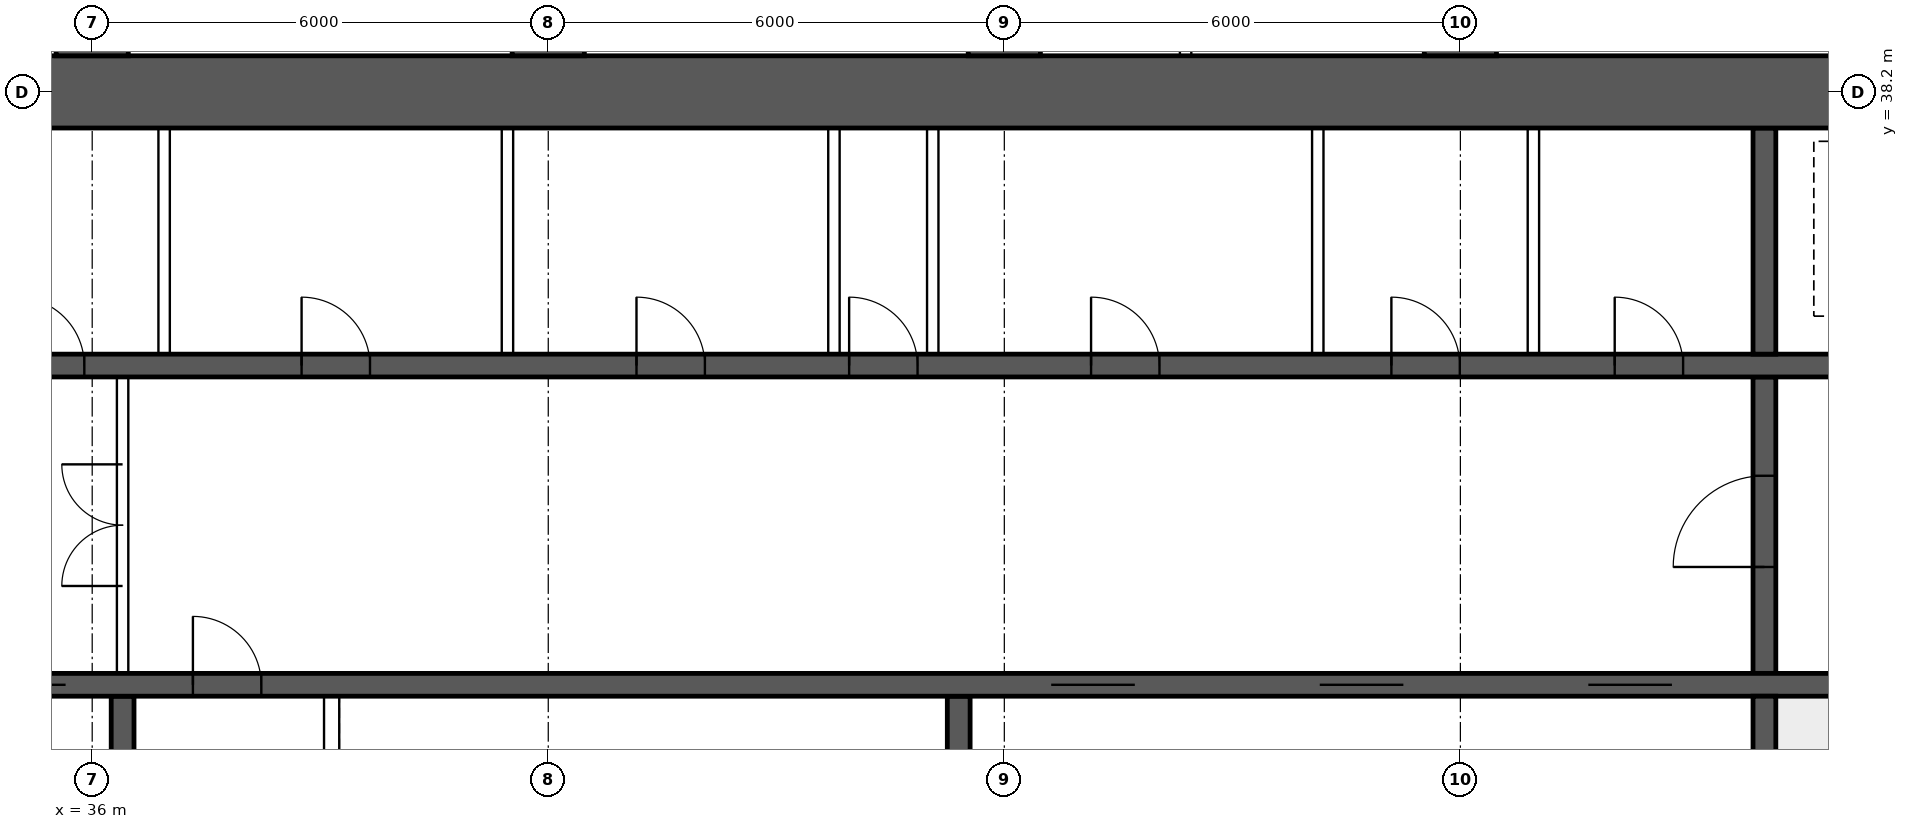
"""IFC4 building model, lengths in metres.
Left out: names, types, materials, properties, quantities, classifications, styles, units other than length and angle.
Written with IfcOpenShell. Run it as: python <this file> out.ifc"""

import sys

from ifc_helpers import new_model, si_unit, direction, frame, frame_2d, origin, place, context, subcontext, project, spatial, rectangle, extrude, element, fill, save


model = new_model("IFC4")
c1 = context("Model", 3, precision=1e-05, world=origin(), true_north=direction((0.0, 1.0)))
c2 = subcontext(c1, "Body", "Model", "MODEL_VIEW")
j1 = project(units=[si_unit("LENGTHUNIT", "METRE"), si_unit("PLANEANGLEUNIT", "RADIAN")], contexts=[c1])
p1 = place(None, origin())
s1 = spatial("IfcSite", under=j1, at=p1, CompositionType="ELEMENT")
p2 = place(p1, origin())
s2 = spatial("IfcBuilding", under=s1, at=p2, CompositionType="ELEMENT")
p3 = place(p2, frame((0.0, 0.0, 91.9)))
s3 = spatial("IfcBuildingStorey", under=s2, at=p3, CompositionType="ELEMENT", Elevation=91.9)
p4 = place(p3, frame((18.0, 38.2, 0.0), z_axis=(0.0, 0.0, 1.0), x_axis=(1.0, 0.0, 0.0)))
e1 = element("IfcWall", 1, at=p4, inside=s3, PredefinedType="SHEAR", context=c2, shape_type="SweptSolid", body=[
    extrude(rectangle(XDim=48.0, YDim=0.95, at=frame_2d((24.0, 0.0))), origin(), (0.0, 0.0, 1.0), 3.75),
])
p5 = place(p3, frame((18.475, 30.4, 0.0), z_axis=(0.0, 0.0, 1.0), x_axis=(1.0, 0.0, 0.0)))
e2 = element("IfcWall", 2, at=p5, inside=s3, PredefinedType="SHEAR", context=c2, shape_type="SweptSolid", body=[
    extrude(rectangle(XDim=47.05, YDim=0.3, at=frame_2d((23.525, 0.0))), origin(), (0.0, 0.0, 1.0), 3.75),
])
p6 = place(p5, frame((0.4, 0.0, 0.0)))
e3 = element("IfcOpeningElement", 3, at=p6, cuts=e2, PredefinedType="OPENING", context=c2, shape_type="SweptSolid", body=[
    extrude(rectangle(XDim=1.0, YDim=2.1, at=frame_2d((0.5, 1.05))), frame((0.0, 0.16, 0.0), z_axis=(0.0, -1.0, 0.0), x_axis=(1.0, 0.0, 0.0)), (0.0, 0.0, 1.0), 0.32),
])
p7 = place(p5, frame((45.65, 0.0, 0.0)))
e4 = element("IfcOpeningElement", 4, at=p7, cuts=e2, PredefinedType="OPENING", context=c2, shape_type="SweptSolid", body=[
    extrude(rectangle(XDim=1.0, YDim=2.1, at=frame_2d((0.5, 1.05))), frame((0.0, 0.16, 0.0), z_axis=(0.0, -1.0, 0.0), x_axis=(1.0, 0.0, 0.0)), (0.0, 0.0, 1.0), 0.32),
])
p8 = place(p5, frame((8.275, 0.0, 0.0)))
e5 = element("IfcOpeningElement", 5, at=p8, cuts=e2, PredefinedType="OPENING", context=c2, shape_type="SweptSolid", body=[
    extrude(rectangle(XDim=1.1, YDim=2.1, at=frame_2d((0.55, 1.05))), frame((0.0, 0.16, 0.0), z_axis=(0.0, -1.0, 0.0), x_axis=(1.0, 0.0, 0.0)), (0.0, 0.0, 1.0), 0.32),
])
p9 = place(p5, frame((10.875, 0.0, 0.0)))
e6 = element("IfcOpeningElement", 6, at=p9, cuts=e2, PredefinedType="OPENING", context=c2, shape_type="SweptSolid", body=[
    extrude(rectangle(XDim=1.1, YDim=2.1, at=frame_2d((0.55, 1.05))), frame((0.0, 0.16, 0.0), z_axis=(0.0, -1.0, 0.0), x_axis=(1.0, 0.0, 0.0)), (0.0, 0.0, 1.0), 0.32),
])
p10 = place(p5, frame((13.475, 0.0, 0.0)))
e7 = element("IfcOpeningElement", 7, at=p10, cuts=e2, PredefinedType="OPENING", context=c2, shape_type="SweptSolid", body=[
    extrude(rectangle(XDim=1.1, YDim=2.1, at=frame_2d((0.55, 1.05))), frame((0.0, 0.16, 0.0), z_axis=(0.0, -1.0, 0.0), x_axis=(1.0, 0.0, 0.0)), (0.0, 0.0, 1.0), 0.32),
])
p11 = place(p5, frame((16.075, 0.0, 0.0)))
e8 = element("IfcOpeningElement", 8, at=p11, cuts=e2, PredefinedType="OPENING", context=c2, shape_type="SweptSolid", body=[
    extrude(rectangle(XDim=1.1, YDim=2.1, at=frame_2d((0.55, 1.05))), frame((0.0, 0.16, 0.0), z_axis=(0.0, -1.0, 0.0), x_axis=(1.0, 0.0, 0.0)), (0.0, 0.0, 1.0), 0.32),
])
p12 = place(p5, frame((18.85, 0.0, 0.0)))
e9 = element("IfcOpeningElement", 9, at=p12, cuts=e2, PredefinedType="OPENING", context=c2, shape_type="SweptSolid", body=[
    extrude(rectangle(XDim=0.9, YDim=2.1, at=frame_2d((0.45, 1.05))), frame((0.0, 0.16, 0.0), z_axis=(0.0, -1.0, 0.0), x_axis=(1.0, 0.0, 0.0)), (0.0, 0.0, 1.0), 0.32),
])
p13 = place(p5, frame((30.142, 0.0, 0.0)))
e10 = element("IfcOpeningElement", 10, at=p13, cuts=e2, PredefinedType="OPENING", context=c2, shape_type="SweptSolid", body=[
    extrude(rectangle(XDim=1.1, YDim=2.1, at=frame_2d((0.55, 1.05))), frame((0.0, 0.16, 0.0), z_axis=(0.0, -1.0, 0.0), x_axis=(1.0, 0.0, 0.0)), (0.0, 0.0, 1.0), 0.32),
])
p14 = place(p5, frame((33.675, 0.0, 0.0)))
e11 = element("IfcOpeningElement", 11, at=p14, cuts=e2, PredefinedType="OPENING", context=c2, shape_type="SweptSolid", body=[
    extrude(rectangle(XDim=1.1, YDim=2.1, at=frame_2d((0.55, 1.05))), frame((0.0, 0.16, 0.0), z_axis=(0.0, -1.0, 0.0), x_axis=(1.0, 0.0, 0.0)), (0.0, 0.0, 1.0), 0.32),
])
p15 = place(p5, frame((37.208, 0.0, 0.0)))
e12 = element("IfcOpeningElement", 12, at=p15, cuts=e2, PredefinedType="OPENING", context=c2, shape_type="SweptSolid", body=[
    extrude(rectangle(XDim=1.1, YDim=2.1, at=frame_2d((0.55, 1.05))), frame((0.0, 0.16, 0.0), z_axis=(0.0, -1.0, 0.0), x_axis=(1.0, 0.0, 0.0)), (0.0, 0.0, 1.0), 0.32),
])
p16 = place(p3, frame((18.475, 34.6, 0.0), z_axis=(0.0, 0.0, 1.0), x_axis=(1.0, 0.0, 0.0)))
e13 = element("IfcWall", 13, at=p16, inside=s3, PredefinedType="SHEAR", context=c2, shape_type="SweptSolid", body=[
    extrude(rectangle(XDim=47.05, YDim=0.3, at=frame_2d((23.525, 0.0))), origin(), (0.0, 0.0, 1.0), 3.75),
])
p17 = place(p16, frame((0.9, 0.0, 0.0)))
e14 = element("IfcOpeningElement", 14, at=p17, cuts=e13, PredefinedType="OPENING", context=c2, shape_type="SweptSolid", body=[
    extrude(rectangle(XDim=1.1, YDim=2.1, at=frame_2d((0.55, 1.05))), frame((0.0, 0.16, 0.0), z_axis=(0.0, -1.0, 0.0), x_axis=(1.0, 0.0, 0.0)), (0.0, 0.0, 1.0), 0.32),
])
p18 = place(p16, frame((45.05, 0.0, 0.0)))
e15 = element("IfcOpeningElement", 15, at=p18, cuts=e13, PredefinedType="OPENING", context=c2, shape_type="SweptSolid", body=[
    extrude(rectangle(XDim=1.1, YDim=2.1, at=frame_2d((0.55, 1.05))), frame((0.0, 0.16, 0.0), z_axis=(0.0, -1.0, 0.0), x_axis=(1.0, 0.0, 0.0)), (0.0, 0.0, 1.0), 0.32),
])
p19 = place(p16, frame((4.125, 0.0, 0.0)))
e16 = element("IfcOpeningElement", 16, at=p19, cuts=e13, PredefinedType="OPENING", context=c2, shape_type="SweptSolid", body=[
    extrude(rectangle(XDim=0.9, YDim=2.1, at=frame_2d((0.45, 1.05))), frame((0.0, 0.16, 0.0), z_axis=(0.0, -1.0, 0.0), x_axis=(1.0, 0.0, 0.0)), (0.0, 0.0, 1.0), 0.32),
])
p20 = place(p16, frame((42.025, 0.0, 0.0)))
e17 = element("IfcOpeningElement", 17, at=p20, cuts=e13, PredefinedType="OPENING", context=c2, shape_type="SweptSolid", body=[
    extrude(rectangle(XDim=0.9, YDim=2.1, at=frame_2d((0.45, 1.05))), frame((0.0, 0.16, 0.0), z_axis=(0.0, -1.0, 0.0), x_axis=(1.0, 0.0, 0.0)), (0.0, 0.0, 1.0), 0.32),
])
p21 = place(p16, frame((8.9, 0.0, 0.0)))
e18 = element("IfcOpeningElement", 18, at=p21, cuts=e13, PredefinedType="OPENING", context=c2, shape_type="SweptSolid", body=[
    extrude(rectangle(XDim=0.9, YDim=2.1, at=frame_2d((0.45, 1.05))), frame((0.0, 0.16, 0.0), z_axis=(0.0, -1.0, 0.0), x_axis=(1.0, 0.0, 0.0)), (0.0, 0.0, 1.0), 0.32),
])
p22 = place(p16, frame((12.874, 0.0, 0.0)))
e19 = element("IfcOpeningElement", 19, at=p22, cuts=e13, PredefinedType="OPENING", context=c2, shape_type="SweptSolid", body=[
    extrude(rectangle(XDim=0.9, YDim=2.1, at=frame_2d((0.45, 1.05))), frame((0.0, 0.16, 0.0), z_axis=(0.0, -1.0, 0.0), x_axis=(1.0, 0.0, 0.0)), (0.0, 0.0, 1.0), 0.32),
])
p23 = place(p16, frame((16.521, 0.0, 0.0)))
e20 = element("IfcOpeningElement", 20, at=p23, cuts=e13, PredefinedType="OPENING", context=c2, shape_type="SweptSolid", body=[
    extrude(rectangle(XDim=0.9, YDim=2.1, at=frame_2d((0.45, 1.05))), frame((0.0, 0.16, 0.0), z_axis=(0.0, -1.0, 0.0), x_axis=(1.0, 0.0, 0.0)), (0.0, 0.0, 1.0), 0.32),
])
p24 = place(p16, frame((20.28, 0.0, 0.0)))
e21 = element("IfcOpeningElement", 21, at=p24, cuts=e13, PredefinedType="OPENING", context=c2, shape_type="SweptSolid", body=[
    extrude(rectangle(XDim=0.9, YDim=2.1, at=frame_2d((0.45, 1.05))), frame((0.0, 0.16, 0.0), z_axis=(0.0, -1.0, 0.0), x_axis=(1.0, 0.0, 0.0)), (0.0, 0.0, 1.0), 0.32),
])
p25 = place(p16, frame((24.686, 0.0, 0.0)))
e22 = element("IfcOpeningElement", 22, at=p25, cuts=e13, PredefinedType="OPENING", context=c2, shape_type="SweptSolid", body=[
    extrude(rectangle(XDim=0.9, YDim=2.1, at=frame_2d((0.45, 1.05))), frame((0.0, 0.16, 0.0), z_axis=(0.0, -1.0, 0.0), x_axis=(1.0, 0.0, 0.0)), (0.0, 0.0, 1.0), 0.32),
])
p26 = place(p16, frame((27.483, 0.0, 0.0)))
e23 = element("IfcOpeningElement", 23, at=p26, cuts=e13, PredefinedType="OPENING", context=c2, shape_type="SweptSolid", body=[
    extrude(rectangle(XDim=0.9, YDim=2.1, at=frame_2d((0.45, 1.05))), frame((0.0, 0.16, 0.0), z_axis=(0.0, -1.0, 0.0), x_axis=(1.0, 0.0, 0.0)), (0.0, 0.0, 1.0), 0.32),
])
p27 = place(p16, frame((30.666, 0.0, 0.0)))
e24 = element("IfcOpeningElement", 24, at=p27, cuts=e13, PredefinedType="OPENING", context=c2, shape_type="SweptSolid", body=[
    extrude(rectangle(XDim=0.9, YDim=2.1, at=frame_2d((0.45, 1.05))), frame((0.0, 0.16, 0.0), z_axis=(0.0, -1.0, 0.0), x_axis=(1.0, 0.0, 0.0)), (0.0, 0.0, 1.0), 0.32),
])
p28 = place(p16, frame((34.617, 0.0, 0.0)))
e25 = element("IfcOpeningElement", 25, at=p28, cuts=e13, PredefinedType="OPENING", context=c2, shape_type="SweptSolid", body=[
    extrude(rectangle(XDim=0.9, YDim=2.1, at=frame_2d((0.45, 1.05))), frame((0.0, 0.16, 0.0), z_axis=(0.0, -1.0, 0.0), x_axis=(1.0, 0.0, 0.0)), (0.0, 0.0, 1.0), 0.32),
])
p29 = place(p16, frame((37.555, 0.0, 0.0)))
e26 = element("IfcOpeningElement", 26, at=p29, cuts=e13, PredefinedType="OPENING", context=c2, shape_type="SweptSolid", body=[
    extrude(rectangle(XDim=0.9, YDim=2.1, at=frame_2d((0.45, 1.05))), frame((0.0, 0.16, 0.0), z_axis=(0.0, -1.0, 0.0), x_axis=(1.0, 0.0, 0.0)), (0.0, 0.0, 1.0), 0.32),
])
p30 = place(p3, frame((58.0, 26.275, 0.0), z_axis=(0.0, 0.0, 1.0), x_axis=(0.0, 1.0, 0.0)))
e27 = element("IfcWall", 27, at=p30, inside=s3, PredefinedType="SHEAR", context=c2, shape_type="SweptSolid", body=[
    extrude(rectangle(XDim=3.975, YDim=0.3, at=frame_2d((1.988, 0.0))), origin(), (0.0, 0.0, 1.0), 3.75),
])
p31 = place(p3, frame((58.0, 30.55, 0.0), z_axis=(0.0, 0.0, 1.0), x_axis=(0.0, 1.0, 0.0)))
e28 = element("IfcWall", 28, at=p31, inside=s3, PredefinedType="SHEAR", context=c2, shape_type="SweptSolid", body=[
    extrude(rectangle(XDim=3.9, YDim=0.3, at=frame_2d((1.95, 0.0))), origin(), (0.0, 0.0, 1.0), 3.75),
])
p32 = place(p31, frame((1.4, 0.0, 0.0)))
e29 = element("IfcOpeningElement", 29, at=p32, cuts=e28, PredefinedType="OPENING", context=c2, shape_type="SweptSolid", body=[
    extrude(rectangle(XDim=1.2, YDim=2.1, at=frame_2d((0.6, 1.05))), frame((0.0, 0.16, 0.0), z_axis=(0.0, -1.0, 0.0), x_axis=(1.0, 0.0, 0.0)), (0.0, 0.0, 1.0), 0.32),
])
p33 = place(p3, frame((58.0, 34.75, 0.0), z_axis=(0.0, 0.0, 1.0), x_axis=(0.0, 1.0, 0.0)))
e30 = element("IfcWall", 30, at=p33, inside=s3, PredefinedType="SHEAR", context=c2, shape_type="SweptSolid", body=[
    extrude(rectangle(XDim=2.975, YDim=0.3, at=frame_2d((1.488, 0.0))), origin(), (0.0, 0.0, 1.0), 3.75),
])
for number, where, z_axis, x_axis in (
    (31, (36.4, 26.275, 0.0), (0.0, 0.0, 1.0), (0.0, 1.0, 0.0)),
    (32, (47.4, 26.275, 0.0), (0.0, 0.0, 1.0), (0.0, 1.0, 0.0)),
):
    element("IfcWall", number, at=place(p3, frame(where, z_axis=z_axis, x_axis=x_axis)), inside=s3, PredefinedType="SHEAR", context=c2, shape_type="SweptSolid", body=[
        extrude(rectangle(XDim=3.975, YDim=0.3, at=frame_2d((1.988, 0.0))), origin(), (0.0, 0.0, 1.0), 3.75),
    ])
for number, where, z_axis, x_axis in (
    (33, (36.0, 38.675, 0.0), (0.0, 0.0, 1.0), (0.0, 1.0, 0.0)),
    (34, (42.0, 38.675, 0.0), (0.0, 0.0, 1.0), (0.0, 1.0, 0.0)),
    (35, (48.0, 38.675, 0.0), (0.0, 0.0, 1.0), (0.0, 1.0, 0.0)),
    (36, (54.0, 38.675, 0.0), (0.0, 0.0, 1.0), (0.0, 1.0, 0.0)),
):
    element("IfcWall", number, at=place(p3, frame(where, z_axis=z_axis, x_axis=x_axis)), inside=s3, PredefinedType="SHEAR", context=c2, shape_type="SweptSolid", body=[
        extrude(rectangle(XDim=9.325, YDim=0.95, at=frame_2d((4.663, 0.0))), origin(), (0.0, 0.0, 1.0), 3.75),
    ])
p34 = place(p3, frame((36.4, 30.55, 0.0), z_axis=(0.0, 0.0, 1.0), x_axis=(0.0, 1.0, 0.0)))
e37 = element("IfcWall", 37, at=p34, inside=s3, PredefinedType="SOLIDWALL", context=c2, shape_type="SweptSolid", body=[
    extrude(rectangle(XDim=3.9, YDim=0.15, at=frame_2d((1.95, 0.0))), origin(), (0.0, 0.0, 1.0), 3.5),
])
p35 = place(p34, frame((1.15, 0.0, 0.0)))
e38 = element("IfcOpeningElement", 38, at=p35, cuts=e37, PredefinedType="OPENING", context=c2, shape_type="SweptSolid", body=[
    extrude(rectangle(XDim=1.6, YDim=2.1, at=frame_2d((0.8, 1.05))), frame((0.0, 0.085, 0.0), z_axis=(0.0, -1.0, 0.0), x_axis=(1.0, 0.0, 0.0)), (0.0, 0.0, 1.0), 0.17),
])
for number, where, z_axis, x_axis in (
    (39, (36.946, 34.75, 0.0), (0.0, 0.0, 1.0), (0.0, 1.0, 0.0)),
    (40, (41.463, 34.75, 0.0), (0.0, 0.0, 1.0), (0.0, 1.0, 0.0)),
    (41, (45.758, 34.75, 0.0), (0.0, 0.0, 1.0), (0.0, 1.0, 0.0)),
    (42, (47.058, 34.75, 0.0), (0.0, 0.0, 1.0), (0.0, 1.0, 0.0)),
    (43, (52.124, 34.75, 0.0), (0.0, 0.0, 1.0), (0.0, 1.0, 0.0)),
    (44, (54.961, 34.75, 0.0), (0.0, 0.0, 1.0), (0.0, 1.0, 0.0)),
):
    element("IfcWall", number, at=place(p3, frame(where, z_axis=z_axis, x_axis=x_axis)), inside=s3, PredefinedType="SOLIDWALL", context=c2, shape_type="SweptSolid", body=[
        extrude(rectangle(XDim=2.975, YDim=0.15, at=frame_2d((1.488, 0.0))), origin(), (0.0, 0.0, 1.0), 3.5),
    ])
p36 = place(p3, frame((39.15, 26.275, 0.0), z_axis=(0.0, 0.0, 1.0), x_axis=(0.0, 1.0, 0.0)))
e45 = element("IfcWall", 45, at=p36, inside=s3, PredefinedType="SOLIDWALL", context=c2, shape_type="SweptSolid", body=[
    extrude(rectangle(XDim=3.975, YDim=0.2, at=frame_2d((1.988, 0.0))), origin(), (0.0, 0.0, 1.0), 3.5),
])
p37 = place(p3, frame((50.385, 38.675, 0.0), z_axis=(0.0, 0.0, 1.0), x_axis=(0.0, 1.0, 0.0)))
e46 = element("IfcWall", 46, at=p37, inside=s3, PredefinedType="PARTITIONING", context=c2, shape_type="SweptSolid", body=[
    extrude(rectangle(XDim=9.225, YDim=0.15, at=frame_2d((4.612, 0.0))), origin(), (0.0, 0.0, 1.0), 3.5),
])
p38 = place(p35, origin())
e47 = element("IfcDoor", 47, at=p38, inside=s3, OperationType="DOUBLE_DOOR_SINGLE_SWING", PredefinedType="DOOR", context=c2, shape_type="SweptSolid", body=[
    extrude(rectangle(XDim=1.6, YDim=2.1, at=frame_2d((0.8, 1.05))), frame((0.0, 0.025, 0.0), z_axis=(0.0, -1.0, 0.0), x_axis=(1.0, 0.0, 0.0)), (0.0, 0.0, 1.0), 0.05),
])
fill(e38, e47)
p39 = place(p32, origin())
e48 = element("IfcDoor", 48, at=p39, inside=s3, OperationType="SINGLE_SWING_LEFT", PredefinedType="DOOR", context=c2, shape_type="SweptSolid", body=[
    extrude(rectangle(XDim=1.2, YDim=2.1, at=frame_2d((0.6, 1.05))), frame((0.0, 0.025, 0.0), z_axis=(0.0, -1.0, 0.0), x_axis=(1.0, 0.0, 0.0)), (0.0, 0.0, 1.0), 0.05),
])
fill(e29, e48)
p40 = place(p23, origin())
e49 = element("IfcDoor", 49, at=p40, inside=s3, OperationType="SINGLE_SWING_LEFT", PredefinedType="DOOR", context=c2, shape_type="SweptSolid", body=[
    extrude(rectangle(XDim=0.9, YDim=2.1, at=frame_2d((0.45, 1.05))), frame((0.0, 0.025, 0.0), z_axis=(0.0, -1.0, 0.0), x_axis=(1.0, 0.0, 0.0)), (0.0, 0.0, 1.0), 0.05),
])
fill(e20, e49)
p41 = place(p24, origin())
e50 = element("IfcDoor", 50, at=p41, inside=s3, OperationType="SINGLE_SWING_LEFT", PredefinedType="DOOR", context=c2, shape_type="SweptSolid", body=[
    extrude(rectangle(XDim=0.9, YDim=2.1, at=frame_2d((0.45, 1.05))), frame((0.0, 0.025, 0.0), z_axis=(0.0, -1.0, 0.0), x_axis=(1.0, 0.0, 0.0)), (0.0, 0.0, 1.0), 0.05),
])
fill(e21, e50)
p42 = place(p25, origin())
e51 = element("IfcDoor", 51, at=p42, inside=s3, OperationType="SINGLE_SWING_LEFT", PredefinedType="DOOR", context=c2, shape_type="SweptSolid", body=[
    extrude(rectangle(XDim=0.9, YDim=2.1, at=frame_2d((0.45, 1.05))), frame((0.0, 0.025, 0.0), z_axis=(0.0, -1.0, 0.0), x_axis=(1.0, 0.0, 0.0)), (0.0, 0.0, 1.0), 0.05),
])
fill(e22, e51)
p43 = place(p26, origin())
e52 = element("IfcDoor", 52, at=p43, inside=s3, OperationType="SINGLE_SWING_LEFT", PredefinedType="DOOR", context=c2, shape_type="SweptSolid", body=[
    extrude(rectangle(XDim=0.9, YDim=2.1, at=frame_2d((0.45, 1.05))), frame((0.0, 0.025, 0.0), z_axis=(0.0, -1.0, 0.0), x_axis=(1.0, 0.0, 0.0)), (0.0, 0.0, 1.0), 0.05),
])
fill(e23, e52)
p44 = place(p27, origin())
e53 = element("IfcDoor", 53, at=p44, inside=s3, OperationType="SINGLE_SWING_LEFT", PredefinedType="DOOR", context=c2, shape_type="SweptSolid", body=[
    extrude(rectangle(XDim=0.9, YDim=2.1, at=frame_2d((0.45, 1.05))), frame((0.0, 0.025, 0.0), z_axis=(0.0, -1.0, 0.0), x_axis=(1.0, 0.0, 0.0)), (0.0, 0.0, 1.0), 0.05),
])
fill(e24, e53)
p45 = place(p28, origin())
e54 = element("IfcDoor", 54, at=p45, inside=s3, OperationType="SINGLE_SWING_LEFT", PredefinedType="DOOR", context=c2, shape_type="SweptSolid", body=[
    extrude(rectangle(XDim=0.9, YDim=2.1, at=frame_2d((0.45, 1.05))), frame((0.0, 0.025, 0.0), z_axis=(0.0, -1.0, 0.0), x_axis=(1.0, 0.0, 0.0)), (0.0, 0.0, 1.0), 0.05),
])
fill(e25, e54)
p46 = place(p29, origin())
e55 = element("IfcDoor", 55, at=p46, inside=s3, OperationType="SINGLE_SWING_LEFT", PredefinedType="DOOR", context=c2, shape_type="SweptSolid", body=[
    extrude(rectangle(XDim=0.9, YDim=2.1, at=frame_2d((0.45, 1.05))), frame((0.0, 0.025, 0.0), z_axis=(0.0, -1.0, 0.0), x_axis=(1.0, 0.0, 0.0)), (0.0, 0.0, 1.0), 0.05),
])
fill(e26, e55)
p47 = place(p11, origin())
e56 = element("IfcDoor", 56, at=p47, inside=s3, OperationType="DOUBLE_DOOR_SLIDING", PredefinedType="DOOR", context=c2, shape_type="SweptSolid", body=[
    extrude(rectangle(XDim=1.1, YDim=2.1, at=frame_2d((0.55, 1.05))), frame((0.0, 0.025, 0.0), z_axis=(0.0, -1.0, 0.0), x_axis=(1.0, 0.0, 0.0)), (0.0, 0.0, 1.0), 0.05),
])
fill(e8, e56)
p48 = place(p12, origin())
e57 = element("IfcDoor", 57, at=p48, inside=s3, OperationType="SINGLE_SWING_LEFT", PredefinedType="DOOR", context=c2, shape_type="SweptSolid", body=[
    extrude(rectangle(XDim=0.9, YDim=2.1, at=frame_2d((0.45, 1.05))), frame((0.0, 0.025, 0.0), z_axis=(0.0, -1.0, 0.0), x_axis=(1.0, 0.0, 0.0)), (0.0, 0.0, 1.0), 0.05),
])
fill(e9, e57)
p49 = place(p13, origin())
e58 = element("IfcDoor", 58, at=p49, inside=s3, OperationType="DOUBLE_DOOR_SLIDING", PredefinedType="DOOR", context=c2, shape_type="SweptSolid", body=[
    extrude(rectangle(XDim=1.1, YDim=2.1, at=frame_2d((0.55, 1.05))), frame((0.0, 0.025, 0.0), z_axis=(0.0, -1.0, 0.0), x_axis=(1.0, 0.0, 0.0)), (0.0, 0.0, 1.0), 0.05),
])
fill(e10, e58)
p50 = place(p14, origin())
e59 = element("IfcDoor", 59, at=p50, inside=s3, OperationType="DOUBLE_DOOR_SLIDING", PredefinedType="DOOR", context=c2, shape_type="SweptSolid", body=[
    extrude(rectangle(XDim=1.1, YDim=2.1, at=frame_2d((0.55, 1.05))), frame((0.0, 0.025, 0.0), z_axis=(0.0, -1.0, 0.0), x_axis=(1.0, 0.0, 0.0)), (0.0, 0.0, 1.0), 0.05),
])
fill(e11, e59)
p51 = place(p15, origin())
e60 = element("IfcDoor", 60, at=p51, inside=s3, OperationType="DOUBLE_DOOR_SLIDING", PredefinedType="DOOR", context=c2, shape_type="SweptSolid", body=[
    extrude(rectangle(XDim=1.1, YDim=2.1, at=frame_2d((0.55, 1.05))), frame((0.0, 0.025, 0.0), z_axis=(0.0, -1.0, 0.0), x_axis=(1.0, 0.0, 0.0)), (0.0, 0.0, 1.0), 0.05),
])
fill(e12, e60)
save(model, sys.argv[1])
